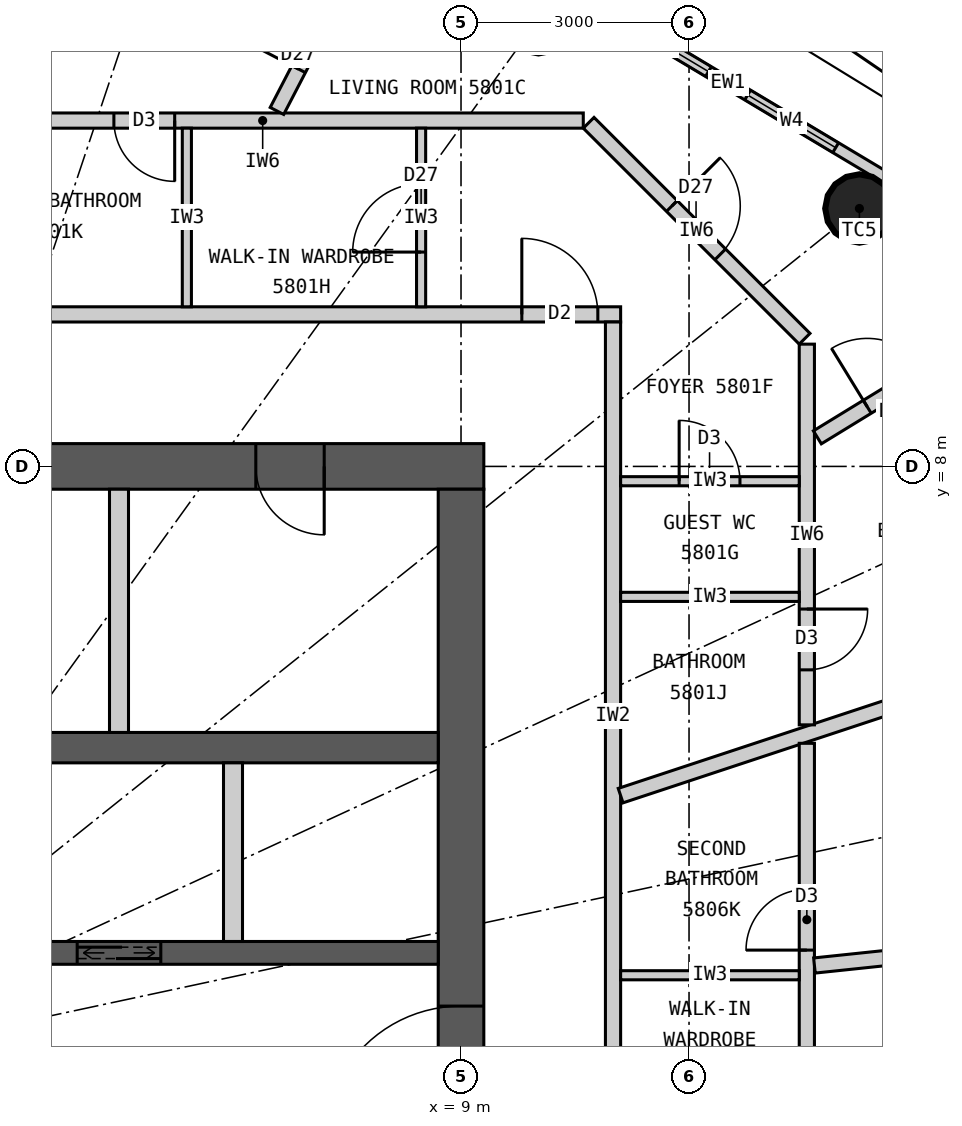
"""IFC4 building model, lengths in metres.
Left out: names, types, materials, properties, quantities, classifications, styles, units other than length and angle.
Written with IfcOpenShell. Run it as: python <this file> out.ifc"""

import sys

from ifc_helpers import new_model, si_unit, direction, frame, frame_2d, origin, origin_2d, place, context, subcontext, project, spatial, rectangle, circle, extrude, element, fill, save


model = new_model("IFC4")
c1 = context("Model", 3, precision=1e-05, world=origin(), true_north=direction((0.0, 1.0)))
c2 = subcontext(c1, "Body", "Model", "MODEL_VIEW")
j1 = project(units=[si_unit("LENGTHUNIT", "METRE"), si_unit("PLANEANGLEUNIT", "RADIAN")], contexts=[c1])
p1 = place(None, origin())
s1 = spatial("IfcSite", under=j1, at=p1, CompositionType="ELEMENT")
p2 = place(p1, origin())
s2 = spatial("IfcBuilding", under=s1, at=p2, CompositionType="ELEMENT")
p3 = place(p2, frame((0.0, 0.0, 216.0)))
s3 = spatial("IfcBuildingStorey", under=s2, at=p3, CompositionType="ELEMENT", Elevation=216.0)
for number, where, z_axis, x_axis in (
    (1, (14.241, 11.393, 0.0), (0.0, 0.0, 1.0), (1.0, 0.0, 0.0)),
    (2, (10.019, 13.883, 0.0), (0.0, 0.0, 1.0), (1.0, 0.0, 0.0)),
):
    element("IfcColumn", number, at=place(p3, frame(where, z_axis=z_axis, x_axis=x_axis)), inside=s3, PredefinedType="COLUMN", context=c2, shape_type="SweptSolid", body=[
        extrude(circle(Radius=0.45, at=origin_2d()), origin(), (0.0, 0.0, 1.0), 3.3),
    ])
p4 = place(p3, frame((-9.3, 8.0, 0.0), z_axis=(0.0, 0.0, 1.0), x_axis=(1.0, 0.0, 0.0)))
e3 = element("IfcWall", 3, at=p4, inside=s3, PredefinedType="SHEAR", context=c2, shape_type="SweptSolid", body=[
    extrude(rectangle(XDim=18.6, YDim=0.6, at=frame_2d((9.3, 0.0))), origin(), (0.0, 0.0, 1.0), 3.3),
])
p5 = place(p4, frame((8.0, 0.0, 0.0)))
e4 = element("IfcOpeningElement", 4, at=p5, cuts=e3, PredefinedType="OPENING", context=c2, shape_type="SweptSolid", body=[
    extrude(rectangle(XDim=1.2, YDim=2.2, at=frame_2d((0.6, 1.1))), frame((0.0, 0.31, 0.0), z_axis=(0.0, -1.0, 0.0), x_axis=(1.0, 0.0, 0.0)), (0.0, 0.0, 1.0), 0.62),
])
p6 = place(p4, frame((15.6, 0.0, 0.0)))
e5 = element("IfcOpeningElement", 5, at=p6, cuts=e3, PredefinedType="OPENING", context=c2, shape_type="SweptSolid", body=[
    extrude(rectangle(XDim=0.9, YDim=2.2, at=frame_2d((0.45, 1.1))), frame((0.0, 0.31, 0.0), z_axis=(0.0, -1.0, 0.0), x_axis=(1.0, 0.0, 0.0)), (0.0, 0.0, 1.0), 0.62),
])
p7 = place(p3, frame((9.0, -7.7, 0.0), z_axis=(0.0, 0.0, 1.0), x_axis=(0.0, 1.0, 0.0)))
e6 = element("IfcWall", 6, at=p7, inside=s3, PredefinedType="SHEAR", context=c2, shape_type="SweptSolid", body=[
    extrude(rectangle(XDim=15.4, YDim=0.6, at=frame_2d((7.7, 0.0))), origin(), (0.0, 0.0, 1.0), 3.3),
])
p8 = place(p7, frame((6.8, 0.0, 0.0)))
e7 = element("IfcOpeningElement", 7, at=p8, cuts=e6, PredefinedType="OPENING", context=c2, shape_type="SweptSolid", body=[
    extrude(rectangle(XDim=1.8, YDim=2.2, at=frame_2d((0.9, 1.1))), frame((0.0, 0.31, 0.0), z_axis=(0.0, -1.0, 0.0), x_axis=(1.0, 0.0, 0.0)), (0.0, 0.0, 1.0), 0.62),
])
p9 = place(p3, frame((-8.7, 4.3, 0.0), z_axis=(0.0, 0.0, 1.0), x_axis=(1.0, 0.0, 0.0)))
e8 = element("IfcWall", 8, at=p9, inside=s3, PredefinedType="SHEAR", context=c2, shape_type="SweptSolid", body=[
    extrude(rectangle(XDim=17.4, YDim=0.4, at=frame_2d((8.7, 0.0))), origin(), (0.0, 0.0, 1.0), 3.3),
])
p10 = place(p3, frame((-8.7, 1.6, 0.0), z_axis=(0.0, 0.0, 1.0), x_axis=(1.0, 0.0, 0.0)))
e9 = element("IfcWall", 9, at=p10, inside=s3, PredefinedType="SHEAR", context=c2, shape_type="SweptSolid", body=[
    extrude(rectangle(XDim=17.4, YDim=0.3, at=frame_2d((8.7, 0.0))), origin(), (0.0, 0.0, 1.0), 3.3),
])
p11 = place(p10, frame((12.65, 0.0, 0.0)))
e10 = element("IfcOpeningElement", 10, at=p11, cuts=e9, PredefinedType="OPENING", context=c2, shape_type="SweptSolid", body=[
    extrude(rectangle(XDim=1.1, YDim=2.2, at=frame_2d((0.55, 1.1))), frame((0.0, 0.16, 0.0), z_axis=(0.0, -1.0, 0.0), x_axis=(1.0, 0.0, 0.0)), (0.0, 0.0, 1.0), 0.32),
])
p12 = place(p10, frame((2.25, 0.0, 0.0)))
e11 = element("IfcOpeningElement", 11, at=p12, cuts=e9, PredefinedType="OPENING", context=c2, shape_type="SweptSolid", body=[
    extrude(rectangle(XDim=0.9, YDim=2.2, at=frame_2d((0.45, 1.1))), frame((0.0, 0.16, 0.0), z_axis=(0.0, -1.0, 0.0), x_axis=(1.0, 0.0, 0.0)), (0.0, 0.0, 1.0), 0.32),
])
p13 = place(p10, frame((8.25, 0.0, 0.0)))
e12 = element("IfcOpeningElement", 12, at=p13, cuts=e9, PredefinedType="OPENING", context=c2, shape_type="SweptSolid", body=[
    extrude(rectangle(XDim=0.9, YDim=2.2, at=frame_2d((0.45, 1.1))), frame((0.0, 0.16, 0.0), z_axis=(0.0, -1.0, 0.0), x_axis=(1.0, 0.0, 0.0)), (0.0, 0.0, 1.0), 0.32),
])
p14 = place(p3, frame((4.5, 4.5, 0.0), z_axis=(0.0, 0.0, 1.0), x_axis=(0.0, 1.0, 0.0)))
e13 = element("IfcWall", 13, at=p14, inside=s3, PredefinedType="PARTITIONING", context=c2, shape_type="SweptSolid", body=[
    extrude(rectangle(XDim=3.2, YDim=0.25, at=frame_2d((1.6, 0.0))), origin(), (0.0, 0.0, 1.0), 3.3),
])
p15 = place(p3, frame((6.0, 1.75, 0.0), z_axis=(0.0, 0.0, 1.0), x_axis=(0.0, 1.0, 0.0)))
e14 = element("IfcWall", 14, at=p15, inside=s3, PredefinedType="PARTITIONING", context=c2, shape_type="SweptSolid", body=[
    extrude(rectangle(XDim=2.35, YDim=0.25, at=frame_2d((1.175, 0.0))), origin(), (0.0, 0.0, 1.0), 3.3),
])
p16 = place(p3, frame((14.68, 11.744, 0.0), z_axis=(0.0, 0.0, 1.0), x_axis=(-0.85822150553, 0.513279502265, 0.0)))
e15 = element("IfcWall", 15, at=p16, inside=s3, PredefinedType="ELEMENTEDWALL", context=c2, shape_type="SweptSolid", body=[
    extrude(rectangle(XDim=5.05, YDim=0.15, at=frame_2d((2.525, 0.0))), origin(), (0.0, 0.0, 1.0), 3.12),
])
p17 = place(p16, frame((0.875, 0.0, 0.9)))
e16 = element("IfcOpeningElement", 16, at=p17, cuts=e15, PredefinedType="OPENING", context=c2, shape_type="SweptSolid", body=[
    extrude(rectangle(XDim=1.35, YDim=1.9, at=frame_2d((0.675, 0.95))), frame((0.0, 0.085, 0.0), z_axis=(0.0, -1.0, 0.0), x_axis=(1.0, 0.0, 0.0)), (0.0, 0.0, 1.0), 0.17),
])
p18 = place(p16, frame((2.825, 0.0, 0.9)))
e17 = element("IfcOpeningElement", 17, at=p18, cuts=e15, PredefinedType="OPENING", context=c2, shape_type="SweptSolid", body=[
    extrude(rectangle(XDim=1.35, YDim=1.9, at=frame_2d((0.675, 0.95))), frame((0.0, 0.085, 0.0), z_axis=(0.0, -1.0, 0.0), x_axis=(1.0, 0.0, 0.0)), (0.0, 0.0, 1.0), 0.17),
])
p19 = place(p3, frame((-11.1, 10.0, 0.0), z_axis=(0.0, 0.0, 1.0), x_axis=(1.0, 0.0, 0.0)))
e18 = element("IfcWall", 18, at=p19, inside=s3, PredefinedType="PARTITIONING", context=c2, shape_type="SweptSolid", body=[
    extrude(rectangle(XDim=22.2, YDim=0.2, at=frame_2d((11.1, 0.0))), origin(), (0.0, 0.0, 1.0), 3.12),
])
p20 = place(p19, frame((20.9, 0.0, 0.0)))
e19 = element("IfcOpeningElement", 19, at=p20, cuts=e18, PredefinedType="OPENING", context=c2, shape_type="SweptSolid", body=[
    extrude(rectangle(XDim=1.0, YDim=2.2, at=frame_2d((0.5, 1.1))), frame((0.0, 0.11, 0.0), z_axis=(0.0, -1.0, 0.0), x_axis=(1.0, 0.0, 0.0)), (0.0, 0.0, 1.0), 0.22),
])
p21 = place(p19, frame((2.82, 0.0, 0.0)))
e20 = element("IfcOpeningElement", 20, at=p21, cuts=e18, PredefinedType="OPENING", context=c2, shape_type="SweptSolid", body=[
    extrude(rectangle(XDim=1.0, YDim=2.2, at=frame_2d((0.5, 1.1))), frame((0.0, 0.11, 0.0), z_axis=(0.0, -1.0, 0.0), x_axis=(1.0, 0.0, 0.0)), (0.0, 0.0, 1.0), 0.22),
])
p22 = place(p3, frame((11.0, -0.464, 0.0), z_axis=(0.0, 0.0, 1.0), x_axis=(0.0, 1.0, 0.0)))
e21 = element("IfcWall", 21, at=p22, inside=s3, PredefinedType="PARTITIONING", context=c2, shape_type="SweptSolid", body=[
    extrude(rectangle(XDim=10.364, YDim=0.2, at=frame_2d((5.182, 0.0))), origin(), (0.0, 0.0, 1.0), 3.12),
])
p23 = place(p3, frame((11.1, 3.669, 0.0), z_axis=(0.0, 0.0, 1.0), x_axis=(0.949476668397, 0.313837627079, 0.0)))
e22 = element("IfcWall", 22, at=p23, inside=s3, PredefinedType="PARTITIONING", context=c2, shape_type="SweptSolid", body=[
    extrude(rectangle(XDim=8.339, YDim=0.2, at=frame_2d((4.169, 0.0))), origin(), (0.0, 0.0, 1.0), 3.12),
])
p24 = place(p3, frame((13.55, 4.6, 0.0), z_axis=(0.0, 0.0, 1.0), x_axis=(0.0, 1.0, 0.0)))
e23 = element("IfcWall", 23, at=p24, inside=s3, PredefinedType="PARTITIONING", context=c2, shape_type="SweptSolid", body=[
    extrude(rectangle(XDim=5.009, YDim=0.2, at=frame_2d((2.504, 0.0))), origin(), (0.0, 0.0, 1.0), 3.12),
])
p25 = place(p24, frame((0.724, 0.0, 0.0)))
e24 = element("IfcOpeningElement", 24, at=p25, cuts=e23, PredefinedType="OPENING", context=c2, shape_type="SweptSolid", body=[
    extrude(rectangle(XDim=0.8, YDim=2.1, at=frame_2d((0.4, 1.05))), frame((0.0, 0.11, 0.0), z_axis=(0.0, -1.0, 0.0), x_axis=(1.0, 0.0, 0.0)), (0.0, 0.0, 1.0), 0.22),
])
p26 = place(p3, frame((13.521, 9.679, 0.0), z_axis=(0.0, 0.0, 1.0), x_axis=(-0.707106781187, 0.707106781187, 0.0)))
e25 = element("IfcWall", 25, at=p26, inside=s3, PredefinedType="PARTITIONING", context=c2, shape_type="SweptSolid", body=[
    extrude(rectangle(XDim=4.019, YDim=0.2, at=frame_2d((2.009, 0.0))), origin(), (0.0, 0.0, 1.0), 3.12),
])
p27 = place(p26, frame((1.57, 0.0, 0.0)))
e26 = element("IfcOpeningElement", 26, at=p27, cuts=e25, PredefinedType="OPENING", context=c2, shape_type="SweptSolid", body=[
    extrude(rectangle(XDim=0.9, YDim=2.1, at=frame_2d((0.45, 1.05))), frame((0.0, 0.11, 0.0), z_axis=(0.0, -1.0, 0.0), x_axis=(1.0, 0.0, 0.0)), (0.0, 0.0, 1.0), 0.22),
])
p28 = place(p3, frame((10.609, 12.55, 0.0), z_axis=(0.0, 0.0, 1.0), x_axis=(-1.0, 0.0, 0.0)))
e27 = element("IfcWall", 27, at=p28, inside=s3, PredefinedType="PARTITIONING", context=c2, shape_type="SweptSolid", body=[
    extrude(rectangle(XDim=8.437, YDim=0.2, at=frame_2d((4.218, 0.0))), origin(), (0.0, 0.0, 1.0), 3.12),
])
p29 = place(p28, frame((5.376, 0.0, 0.0)))
e28 = element("IfcOpeningElement", 28, at=p29, cuts=e27, PredefinedType="OPENING", context=c2, shape_type="SweptSolid", body=[
    extrude(rectangle(XDim=0.8, YDim=2.1, at=frame_2d((0.4, 1.05))), frame((0.0, 0.11, 0.0), z_axis=(0.0, -1.0, 0.0), x_axis=(1.0, 0.0, 0.0)), (0.0, 0.0, 1.0), 0.22),
])
p30 = place(p3, frame((13.688, 8.382, 0.0), z_axis=(0.0, 0.0, 1.0), x_axis=(0.852783459586, 0.522264656144, 0.0)))
e29 = element("IfcWall", 29, at=p30, inside=s3, PredefinedType="PARTITIONING", context=c2, shape_type="SweptSolid", body=[
    extrude(rectangle(XDim=3.042, YDim=0.2, at=frame_2d((1.521, 0.0))), origin(), (0.0, 0.0, 1.0), 3.12),
])
p31 = place(p30, frame((0.77, 0.0, 0.0)))
e30 = element("IfcOpeningElement", 30, at=p31, cuts=e29, PredefinedType="OPENING", context=c2, shape_type="SweptSolid", body=[
    extrude(rectangle(XDim=0.9, YDim=2.1, at=frame_2d((0.45, 1.05))), frame((0.0, 0.11, 0.0), z_axis=(0.0, -1.0, 0.0), x_axis=(1.0, 0.0, 0.0)), (0.0, 0.0, 1.0), 0.22),
])
p32 = place(p3, frame((6.578, 12.677, 0.0), z_axis=(0.0, 0.0, 1.0), x_axis=(0.460620531465, 0.887597164255, 0.0)))
e31 = element("IfcWall", 31, at=p32, inside=s3, PredefinedType="PARTITIONING", context=c2, shape_type="SweptSolid", body=[
    extrude(rectangle(XDim=2.678, YDim=0.2, at=frame_2d((1.339, 0.0))), origin(), (0.0, 0.0, 1.0), 3.12),
])
p33 = place(p32, frame((0.62, 0.0, 0.0)))
e32 = element("IfcOpeningElement", 32, at=p33, cuts=e31, PredefinedType="OPENING", context=c2, shape_type="SweptSolid", body=[
    extrude(rectangle(XDim=0.9, YDim=2.1, at=frame_2d((0.45, 1.05))), frame((0.0, 0.11, 0.0), z_axis=(0.0, -1.0, 0.0), x_axis=(1.0, 0.0, 0.0)), (0.0, 0.0, 1.0), 0.22),
])
p34 = place(p3, frame((11.1, 6.284, 0.0), z_axis=(0.0, 0.0, 1.0), x_axis=(1.0, 0.0, 0.0)))
e33 = element("IfcWall", 33, at=p34, inside=s3, PredefinedType="PARTITIONING", context=c2, shape_type="SweptSolid", body=[
    extrude(rectangle(XDim=2.35, YDim=0.12, at=frame_2d((1.175, 0.0))), origin(), (0.0, 0.0, 1.0), 3.12),
])
p35 = place(p3, frame((11.1, 7.805, 0.0), z_axis=(0.0, 0.0, 1.0), x_axis=(1.0, 0.0, 0.0)))
e34 = element("IfcWall", 34, at=p35, inside=s3, PredefinedType="PARTITIONING", context=c2, shape_type="SweptSolid", body=[
    extrude(rectangle(XDim=2.35, YDim=0.12, at=frame_2d((1.175, 0.0))), origin(), (0.0, 0.0, 1.0), 3.12),
])
p36 = place(p35, frame((0.77, 0.0, 0.0)))
e35 = element("IfcOpeningElement", 35, at=p36, cuts=e34, PredefinedType="OPENING", context=c2, shape_type="SweptSolid", body=[
    extrude(rectangle(XDim=0.8, YDim=2.1, at=frame_2d((0.4, 1.05))), frame((0.0, 0.07, 0.0), z_axis=(0.0, -1.0, 0.0), x_axis=(1.0, 0.0, 0.0)), (0.0, 0.0, 1.0), 0.14),
])
p37 = place(p3, frame((8.475, 10.1, 0.0), z_axis=(0.0, 0.0, 1.0), x_axis=(0.0, 1.0, 0.0)))
e36 = element("IfcWall", 36, at=p37, inside=s3, PredefinedType="PARTITIONING", context=c2, shape_type="SweptSolid", body=[
    extrude(rectangle(XDim=2.35, YDim=0.12, at=frame_2d((1.175, 0.0))), origin(), (0.0, 0.0, 1.0), 3.12),
])
p38 = place(p37, frame((0.72, 0.0, 0.0)))
e37 = element("IfcOpeningElement", 37, at=p38, cuts=e36, PredefinedType="OPENING", context=c2, shape_type="SweptSolid", body=[
    extrude(rectangle(XDim=0.9, YDim=2.1, at=frame_2d((0.45, 1.05))), frame((0.0, 0.07, 0.0), z_axis=(0.0, -1.0, 0.0), x_axis=(1.0, 0.0, 0.0)), (0.0, 0.0, 1.0), 0.14),
])
p39 = place(p3, frame((5.393, 10.1, 0.0), z_axis=(0.0, 0.0, 1.0), x_axis=(0.0, 1.0, 0.0)))
e38 = element("IfcWall", 38, at=p39, inside=s3, PredefinedType="PARTITIONING", context=c2, shape_type="SweptSolid", body=[
    extrude(rectangle(XDim=2.35, YDim=0.12, at=frame_2d((1.175, 0.0))), origin(), (0.0, 0.0, 1.0), 3.12),
])
p40 = place(p3, frame((13.55, -8.139, 0.0), z_axis=(0.0, 0.0, 1.0), x_axis=(0.0, 1.0, 0.0)))
e39 = element("IfcWall", 39, at=p40, inside=s3, PredefinedType="PARTITIONING", context=c2, shape_type="SweptSolid", body=[
    extrude(rectangle(XDim=12.496, YDim=0.2, at=frame_2d((6.248, 0.0))), origin(), (0.0, 0.0, 1.0), 3.12),
])
p41 = place(p40, frame((2.42, 0.0, 0.0)))
e40 = element("IfcOpeningElement", 40, at=p41, cuts=e39, PredefinedType="OPENING", context=c2, shape_type="SweptSolid", body=[
    extrude(rectangle(XDim=0.8, YDim=2.1, at=frame_2d((0.4, 1.05))), frame((0.0, 0.11, 0.0), z_axis=(0.0, -1.0, 0.0), x_axis=(1.0, 0.0, 0.0)), (0.0, 0.0, 1.0), 0.22),
])
p42 = place(p40, frame((9.776, 0.0, 0.0)))
e41 = element("IfcOpeningElement", 41, at=p42, cuts=e39, PredefinedType="OPENING", context=c2, shape_type="SweptSolid", body=[
    extrude(rectangle(XDim=0.8, YDim=2.1, at=frame_2d((0.4, 1.05))), frame((0.0, 0.11, 0.0), z_axis=(0.0, -1.0, 0.0), x_axis=(1.0, 0.0, 0.0)), (0.0, 0.0, 1.0), 0.22),
])
p43 = place(p40, frame((5.82, 0.0, 0.0)))
e42 = element("IfcOpeningElement", 42, at=p43, cuts=e39, PredefinedType="OPENING", context=c2, shape_type="SweptSolid", body=[
    extrude(rectangle(XDim=0.9, YDim=2.1, at=frame_2d((0.45, 1.05))), frame((0.0, 0.11, 0.0), z_axis=(0.0, -1.0, 0.0), x_axis=(1.0, 0.0, 0.0)), (0.0, 0.0, 1.0), 0.22),
])
p44 = place(p3, frame((13.65, 1.434, 0.0), z_axis=(0.0, 0.0, 1.0), x_axis=(0.994526954268, 0.10448031984, 0.0)))
e43 = element("IfcWall", 43, at=p44, inside=s3, PredefinedType="PARTITIONING", context=c2, shape_type="SweptSolid", body=[
    extrude(rectangle(XDim=6.837, YDim=0.2, at=frame_2d((3.418, 0.0))), origin(), (0.0, 0.0, 1.0), 2.47),
])
p45 = place(p44, frame((2.27, 0.0, 0.0)))
e44 = element("IfcOpeningElement", 44, at=p45, cuts=e43, PredefinedType="OPENING", context=c2, shape_type="SweptSolid", body=[
    extrude(rectangle(XDim=0.9, YDim=2.1, at=frame_2d((0.45, 1.05))), frame((0.0, 0.11, 0.0), z_axis=(0.0, -1.0, 0.0), x_axis=(1.0, 0.0, 0.0)), (0.0, 0.0, 1.0), 0.22),
])
p46 = place(p3, frame((11.1, 1.306, 0.0), z_axis=(0.0, 0.0, 1.0), x_axis=(1.0, 0.0, 0.0)))
e45 = element("IfcWall", 45, at=p46, inside=s3, PredefinedType="PARTITIONING", context=c2, shape_type="SweptSolid", body=[
    extrude(rectangle(XDim=2.35, YDim=0.12, at=frame_2d((1.175, 0.0))), origin(), (0.0, 0.0, 1.0), 3.12),
])
p47 = place(p17, origin())
e46 = element("IfcWindow", 46, at=p47, inside=s3, PartitioningType="SINGLE_PANEL", PredefinedType="WINDOW", context=c2, shape_type="SweptSolid", body=[
    extrude(rectangle(XDim=1.35, YDim=1.9, at=frame_2d((0.675, 0.95))), frame((0.0, 0.03, 0.0), z_axis=(0.0, -1.0, 0.0), x_axis=(1.0, 0.0, 0.0)), (0.0, 0.0, 1.0), 0.06),
])
fill(e16, e46)
p48 = place(p18, origin())
e47 = element("IfcWindow", 47, at=p48, inside=s3, PartitioningType="SINGLE_PANEL", PredefinedType="WINDOW", context=c2, shape_type="SweptSolid", body=[
    extrude(rectangle(XDim=1.35, YDim=1.9, at=frame_2d((0.675, 0.95))), frame((0.0, 0.03, 0.0), z_axis=(0.0, -1.0, 0.0), x_axis=(1.0, 0.0, 0.0)), (0.0, 0.0, 1.0), 0.06),
])
fill(e17, e47)
p49 = place(p20, origin())
e48 = element("IfcDoor", 48, at=p49, inside=s3, OperationType="SINGLE_SWING_LEFT", PredefinedType="DOOR", context=c2, shape_type="SweptSolid", body=[
    extrude(rectangle(XDim=1.0, YDim=2.2, at=frame_2d((0.5, 1.1))), frame((0.0, 0.025, 0.0), z_axis=(0.0, -1.0, 0.0), x_axis=(1.0, 0.0, 0.0)), (0.0, 0.0, 1.0), 0.05),
])
fill(e19, e48)
p50 = place(p25, origin())
e49 = element("IfcDoor", 49, at=p50, inside=s3, OperationType="SINGLE_SWING_RIGHT", PredefinedType="DOOR", context=c2, shape_type="SweptSolid", body=[
    extrude(rectangle(XDim=0.8, YDim=2.1, at=frame_2d((0.4, 1.05))), frame((0.0, 0.025, 0.0), z_axis=(0.0, -1.0, 0.0), x_axis=(1.0, 0.0, 0.0)), (0.0, 0.0, 1.0), 0.05),
])
fill(e24, e49)
p51 = place(p36, origin())
e50 = element("IfcDoor", 50, at=p51, inside=s3, OperationType="SINGLE_SWING_LEFT", PredefinedType="DOOR", context=c2, shape_type="SweptSolid", body=[
    extrude(rectangle(XDim=0.8, YDim=2.1, at=frame_2d((0.4, 1.05))), frame((0.0, 0.025, 0.0), z_axis=(0.0, -1.0, 0.0), x_axis=(1.0, 0.0, 0.0)), (0.0, 0.0, 1.0), 0.05),
])
fill(e35, e50)
p52 = place(p38, origin())
e51 = element("IfcDoor", 51, at=p52, inside=s3, OperationType="SINGLE_SWING_LEFT", PredefinedType="DOOR", context=c2, shape_type="SweptSolid", body=[
    extrude(rectangle(XDim=0.9, YDim=2.1, at=frame_2d((0.45, 1.05))), frame((0.0, 0.025, 0.0), z_axis=(0.0, -1.0, 0.0), x_axis=(1.0, 0.0, 0.0)), (0.0, 0.0, 1.0), 0.05),
])
fill(e37, e51)
p53 = place(p29, origin())
e52 = element("IfcDoor", 52, at=p53, inside=s3, OperationType="SINGLE_SWING_LEFT", PredefinedType="DOOR", context=c2, shape_type="SweptSolid", body=[
    extrude(rectangle(XDim=0.8, YDim=2.1, at=frame_2d((0.4, 1.05))), frame((0.0, 0.025, 0.0), z_axis=(0.0, -1.0, 0.0), x_axis=(1.0, 0.0, 0.0)), (0.0, 0.0, 1.0), 0.05),
])
fill(e28, e52)
p54 = place(p27, origin())
e53 = element("IfcDoor", 53, at=p54, inside=s3, OperationType="SINGLE_SWING_RIGHT", PredefinedType="DOOR", context=c2, shape_type="SweptSolid", body=[
    extrude(rectangle(XDim=0.9, YDim=2.1, at=frame_2d((0.45, 1.05))), frame((0.0, 0.025, 0.0), z_axis=(0.0, -1.0, 0.0), x_axis=(1.0, 0.0, 0.0)), (0.0, 0.0, 1.0), 0.05),
])
fill(e26, e53)
p55 = place(p31, origin())
e54 = element("IfcDoor", 54, at=p55, inside=s3, OperationType="SINGLE_SWING_LEFT", PredefinedType="DOOR", context=c2, shape_type="SweptSolid", body=[
    extrude(rectangle(XDim=0.9, YDim=2.1, at=frame_2d((0.45, 1.05))), frame((0.0, 0.025, 0.0), z_axis=(0.0, -1.0, 0.0), x_axis=(1.0, 0.0, 0.0)), (0.0, 0.0, 1.0), 0.05),
])
fill(e30, e54)
p56 = place(p33, origin())
e55 = element("IfcDoor", 55, at=p56, inside=s3, OperationType="SINGLE_SWING_LEFT", PredefinedType="DOOR", context=c2, shape_type="SweptSolid", body=[
    extrude(rectangle(XDim=0.9, YDim=2.1, at=frame_2d((0.45, 1.05))), frame((0.0, 0.025, 0.0), z_axis=(0.0, -1.0, 0.0), x_axis=(1.0, 0.0, 0.0)), (0.0, 0.0, 1.0), 0.05),
])
fill(e32, e55)
p57 = place(p42, origin())
e56 = element("IfcDoor", 56, at=p57, inside=s3, OperationType="SINGLE_SWING_LEFT", PredefinedType="DOOR", context=c2, shape_type="SweptSolid", body=[
    extrude(rectangle(XDim=0.8, YDim=2.1, at=frame_2d((0.4, 1.05))), frame((0.0, 0.025, 0.0), z_axis=(0.0, -1.0, 0.0), x_axis=(1.0, 0.0, 0.0)), (0.0, 0.0, 1.0), 0.05),
])
fill(e41, e56)
p58 = place(p6, origin())
e57 = element("IfcDoor", 57, at=p58, inside=s3, OperationType="SINGLE_SWING_RIGHT", PredefinedType="DOOR", context=c2, shape_type="SweptSolid", body=[
    extrude(rectangle(XDim=0.9, YDim=2.2, at=frame_2d((0.45, 1.1))), frame((0.0, 0.025, 0.0), z_axis=(0.0, -1.0, 0.0), x_axis=(1.0, 0.0, 0.0)), (0.0, 0.0, 1.0), 0.05),
])
fill(e5, e57)
p59 = place(p11, origin())
e58 = element("IfcDoor", 58, at=p59, inside=s3, OperationType="DOUBLE_DOOR_SLIDING", PredefinedType="DOOR", context=c2, shape_type="SweptSolid", body=[
    extrude(rectangle(XDim=1.1, YDim=2.2, at=frame_2d((0.55, 1.1))), frame((0.0, 0.025, 0.0), z_axis=(0.0, -1.0, 0.0), x_axis=(1.0, 0.0, 0.0)), (0.0, 0.0, 1.0), 0.05),
])
fill(e10, e58)
p60 = place(p8, origin())
e59 = element("IfcDoor", 59, at=p60, inside=s3, OperationType="DOUBLE_DOOR_DOUBLE_SWING", PredefinedType="DOOR", context=c2, shape_type="SweptSolid", body=[
    extrude(rectangle(XDim=1.8, YDim=2.2, at=frame_2d((0.9, 1.1))), frame((0.0, 0.025, 0.0), z_axis=(0.0, -1.0, 0.0), x_axis=(1.0, 0.0, 0.0)), (0.0, 0.0, 1.0), 0.05),
])
fill(e7, e59)
save(model, sys.argv[1])
